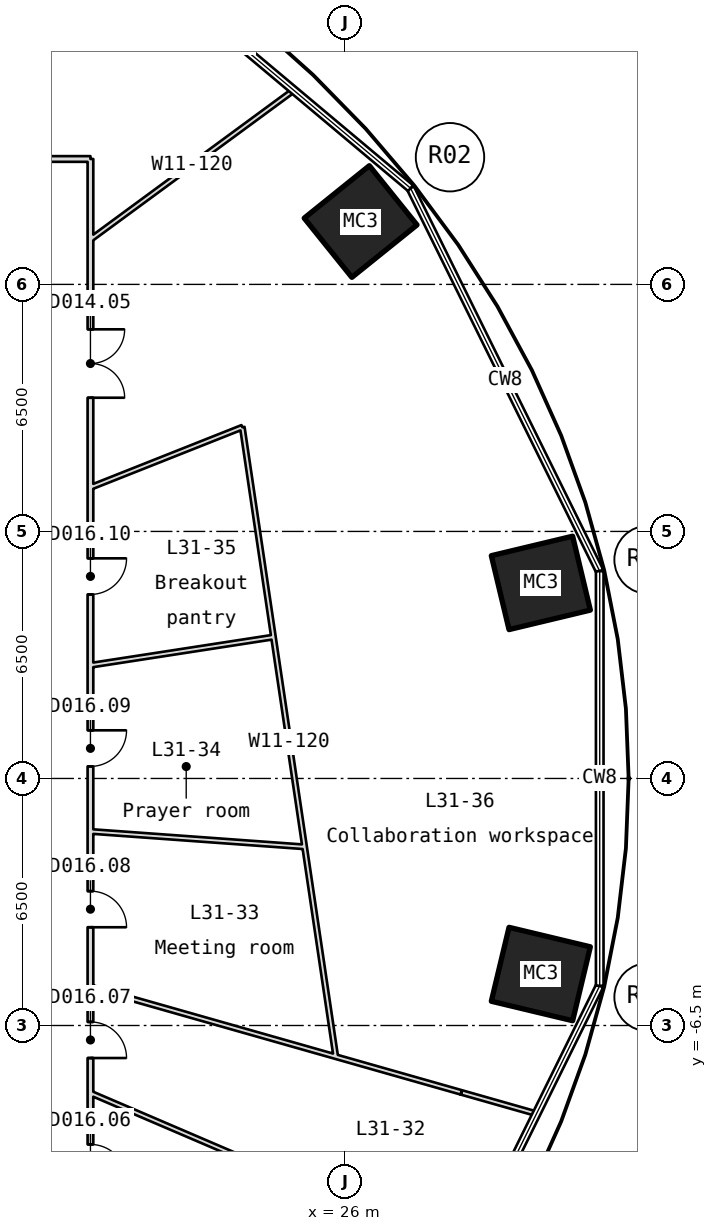
"""IFC4 building model, lengths in metres.
Left out: names, types, materials, properties, quantities, classifications, styles, units other than length and angle.
Written with IfcOpenShell. Run it as: python <this file> out.ifc"""

import sys

from ifc_helpers import new_model, si_unit, direction, frame, frame_2d, origin, origin_2d, place, context, subcontext, project, spatial, rectangle, hollow_rectangle, extrude, element, fill, save


model = new_model("IFC4")
c1 = context("Model", 3, precision=1e-05, world=origin(), true_north=direction((0.0, 1.0)))
c2 = subcontext(c1, "Body", "Model", "MODEL_VIEW")
j1 = project(units=[si_unit("LENGTHUNIT", "METRE"), si_unit("PLANEANGLEUNIT", "RADIAN")], contexts=[c1])
p1 = place(None, origin())
s1 = spatial("IfcSite", under=j1, at=p1, CompositionType="ELEMENT")
p2 = place(p1, origin())
s2 = spatial("IfcBuilding", under=s1, at=p2, CompositionType="ELEMENT")
p3 = place(p2, frame((0.0, 0.0, 145.05)))
s3 = spatial("IfcBuildingStorey", under=s2, at=p3, CompositionType="ELEMENT", Elevation=145.05)
for number, where, z_axis, x_axis in (
    (1, (31.152, 5.146, -0.2), (0.0, 0.0, 1.0), (0.233, -0.972, 0.0)),
    (2, (26.409, 14.654, -0.2), (0.0, 0.0, 1.0), (0.627, -0.779, 0.0)),
    (3, (31.152, -5.146, -0.2), (0.0, 0.0, 1.0), (-0.233, -0.972, 0.0)),
):
    element("IfcColumn", number, at=place(p3, frame(where, z_axis=z_axis, x_axis=x_axis)), inside=s3, PredefinedType="COLUMN", context=c2, shape_type="SweptSolid", body=[
        extrude(hollow_rectangle(XDim=2.0, YDim=2.2, WallThickness=0.08, at=origin_2d()), origin(), (0.0, 0.0, 1.0), 4.5),
    ])
p4 = place(p3, frame((-19.3, 16.3, 0.0), z_axis=(0.0, 0.0, 1.0), x_axis=(1.0, 0.0, 0.0)))
e4 = element("IfcWall", 4, at=p4, inside=s3, PredefinedType="PARTITIONING", context=c2, shape_type="SweptSolid", body=[
    extrude(rectangle(XDim=38.6, YDim=0.15, at=frame_2d((19.3, 0.0))), origin(), (0.0, 0.0, 1.0), 4.3),
])
p5 = place(p4, frame((28.692, 0.0, 0.0)))
e5 = element("IfcOpeningElement", 5, at=p5, cuts=e4, PredefinedType="OPENING", context=c2, shape_type="SweptSolid", body=[
    extrude(rectangle(XDim=1.8, YDim=2.1, at=frame_2d((0.9, 1.05))), frame((0.0, 0.085, 0.0), z_axis=(0.0, -1.0, 0.0), x_axis=(1.0, 0.0, 0.0)), (0.0, 0.0, 1.0), 0.17),
])
p6 = place(p4, frame((9.392, 0.0, 0.0)))
e6 = element("IfcOpeningElement", 6, at=p6, cuts=e4, PredefinedType="OPENING", context=c2, shape_type="SweptSolid", body=[
    extrude(rectangle(XDim=1.8, YDim=2.1, at=frame_2d((0.9, 1.05))), frame((0.0, 0.085, 0.0), z_axis=(0.0, -1.0, 0.0), x_axis=(1.0, 0.0, 0.0)), (0.0, 0.0, 1.0), 0.17),
])
p7 = place(p3, frame((19.3, -5.486, 0.0), z_axis=(0.0, 0.0, 1.0), x_axis=(0.961894512002, -0.273420825432, 0.0)))
e7 = element("IfcWall", 7, at=p7, inside=s3, PredefinedType="PARTITIONING", context=c2, shape_type="SweptSolid", body=[
    extrude(rectangle(XDim=10.144, YDim=0.12, at=frame_2d((5.072, 0.0))), origin(), (0.0, 0.0, 1.0), 3.688),
])
p8 = place(p3, frame((29.058, -8.26, 0.0), z_axis=(0.0, 0.0, 1.0), x_axis=(0.961885727632, -0.27345172696, 0.0)))
e8 = element("IfcWall", 8, at=p8, inside=s3, PredefinedType="PARTITIONING", context=c2, shape_type="SweptSolid", body=[
    extrude(rectangle(XDim=2.058, YDim=0.12, at=frame_2d((1.029, 0.0))), origin(), (0.0, 0.0, 1.0), 4.3),
])
p9 = place(p3, frame((19.3, 14.18, 0.0), z_axis=(0.0, 0.0, 1.0), x_axis=(0.805871425668, 0.592090571865, 0.0)))
e9 = element("IfcWall", 9, at=p9, inside=s3, PredefinedType="PARTITIONING", context=c2, shape_type="SweptSolid", body=[
    extrude(rectangle(XDim=6.637, YDim=0.12, at=frame_2d((3.319, 0.0))), origin(), (0.0, 0.0, 1.0), 4.3),
])
p10 = place(p3, frame((19.3, 16.3, 0.0), z_axis=(0.0, 0.0, 1.0), x_axis=(0.0, -1.0, 0.0)))
e10 = element("IfcWall", 10, at=p10, inside=s3, PredefinedType="PARTITIONING", context=c2, shape_type="SweptSolid", body=[
    extrude(rectangle(XDim=32.6, YDim=0.15, at=frame_2d((16.3, 0.0))), origin(), (0.0, 0.0, 1.0), 4.3),
])
p11 = place(p10, frame((29.941, 0.0, 0.0)))
e11 = element("IfcOpeningElement", 11, at=p11, cuts=e10, PredefinedType="OPENING", context=c2, shape_type="SweptSolid", body=[
    extrude(rectangle(XDim=0.95, YDim=2.1, at=frame_2d((0.475, 1.05))), frame((0.0, 0.085, 0.0), z_axis=(0.0, -1.0, 0.0), x_axis=(1.0, 0.0, 0.0)), (0.0, 0.0, 1.0), 0.17),
])
p12 = place(p10, frame((25.929, 0.0, 0.0)))
e12 = element("IfcOpeningElement", 12, at=p12, cuts=e10, PredefinedType="OPENING", context=c2, shape_type="SweptSolid", body=[
    extrude(rectangle(XDim=0.95, YDim=2.1, at=frame_2d((0.475, 1.05))), frame((0.0, 0.085, 0.0), z_axis=(0.0, -1.0, 0.0), x_axis=(1.0, 0.0, 0.0)), (0.0, 0.0, 1.0), 0.17),
])
p13 = place(p10, frame((22.706, 0.0, 0.0)))
e13 = element("IfcOpeningElement", 13, at=p13, cuts=e10, PredefinedType="OPENING", context=c2, shape_type="SweptSolid", body=[
    extrude(rectangle(XDim=0.95, YDim=2.1, at=frame_2d((0.475, 1.05))), frame((0.0, 0.085, 0.0), z_axis=(0.0, -1.0, 0.0), x_axis=(1.0, 0.0, 0.0)), (0.0, 0.0, 1.0), 0.17),
])
p14 = place(p10, frame((19.265, 0.0, 0.0)))
e14 = element("IfcOpeningElement", 14, at=p14, cuts=e10, PredefinedType="OPENING", context=c2, shape_type="SweptSolid", body=[
    extrude(rectangle(XDim=0.95, YDim=2.1, at=frame_2d((0.475, 1.05))), frame((0.0, 0.085, 0.0), z_axis=(0.0, -1.0, 0.0), x_axis=(1.0, 0.0, 0.0)), (0.0, 0.0, 1.0), 0.17),
])
p15 = place(p10, frame((15.033, 0.0, 0.0)))
e15 = element("IfcOpeningElement", 15, at=p15, cuts=e10, PredefinedType="OPENING", context=c2, shape_type="SweptSolid", body=[
    extrude(rectangle(XDim=0.95, YDim=2.1, at=frame_2d((0.475, 1.05))), frame((0.0, 0.085, 0.0), z_axis=(0.0, -1.0, 0.0), x_axis=(1.0, 0.0, 0.0)), (0.0, 0.0, 1.0), 0.17),
])
p16 = place(p10, frame((10.508, 0.0, 0.0)))
e16 = element("IfcOpeningElement", 16, at=p16, cuts=e10, PredefinedType="OPENING", context=c2, shape_type="SweptSolid", body=[
    extrude(rectangle(XDim=0.95, YDim=2.1, at=frame_2d((0.475, 1.05))), frame((0.0, 0.085, 0.0), z_axis=(0.0, -1.0, 0.0), x_axis=(1.0, 0.0, 0.0)), (0.0, 0.0, 1.0), 0.17),
])
p17 = place(p10, frame((4.482, 0.0, 0.0)))
e17 = element("IfcOpeningElement", 17, at=p17, cuts=e10, PredefinedType="OPENING", context=c2, shape_type="SweptSolid", body=[
    extrude(rectangle(XDim=1.8, YDim=2.1, at=frame_2d((0.9, 1.05))), frame((0.0, 0.085, 0.0), z_axis=(0.0, -1.0, 0.0), x_axis=(1.0, 0.0, 0.0)), (0.0, 0.0, 1.0), 0.17),
])
p18 = place(p3, frame((23.296, 9.242, 0.0), z_axis=(0.0, 0.0, 1.0), x_axis=(-0.92950709005, -0.368804242854, 0.0)))
e18 = element("IfcWall", 18, at=p18, inside=s3, PredefinedType="PARTITIONING", context=c2, shape_type="SweptSolid", body=[
    extrude(rectangle(XDim=4.299, YDim=0.12, at=frame_2d((2.149, 0.0))), origin(), (0.0, 0.0, 1.0), 4.3),
])
p19 = place(p3, frame((24.116, 3.721, 0.0), z_axis=(0.0, 0.0, 1.0), x_axis=(-0.988309639822, -0.152460013889, 0.0)))
e19 = element("IfcWall", 19, at=p19, inside=s3, PredefinedType="PARTITIONING", context=c2, shape_type="SweptSolid", body=[
    extrude(rectangle(XDim=4.873, YDim=0.12, at=frame_2d((2.437, 0.0))), origin(), (0.0, 0.0, 1.0), 4.3),
])
p20 = place(p3, frame((24.936, -1.8, 0.0), z_axis=(0.0, 0.0, 1.0), x_axis=(-0.997405788814, 0.071983973495, 0.0)))
e20 = element("IfcWall", 20, at=p20, inside=s3, PredefinedType="PARTITIONING", context=c2, shape_type="SweptSolid", body=[
    extrude(rectangle(XDim=5.65, YDim=0.12, at=frame_2d((2.825, 0.0))), origin(), (0.0, 0.0, 1.0), 4.3),
])
p21 = place(p3, frame((25.571, -10.966, 0.0), z_axis=(0.0, 0.0, 1.0), x_axis=(-0.919063581566, 0.394109290729, 0.0)))
e21 = element("IfcWall", 21, at=p21, inside=s3, PredefinedType="PARTITIONING", context=c2, shape_type="SweptSolid", body=[
    extrude(rectangle(XDim=6.823, YDim=0.12, at=frame_2d((3.412, 0.0))), origin(), (0.0, 0.0, 1.0), 4.3),
])
p22 = place(p3, frame((25.756, -7.321, 0.0), z_axis=(0.0, 0.0, 1.0), x_axis=(-0.146891581146, 0.989152598636, 0.0)))
e22 = element("IfcWall", 22, at=p22, inside=s3, PredefinedType="PARTITIONING", context=c2, shape_type="SweptSolid", body=[
    extrude(rectangle(XDim=16.745, YDim=0.12, at=frame_2d((8.373, 0.0))), origin(), (0.0, 0.0, 1.0), 4.3),
])
p23 = place(p12, origin())
e23 = element("IfcDoor", 23, at=p23, inside=s3, OperationType="SINGLE_SWING_RIGHT", PredefinedType="DOOR", context=c2, shape_type="SweptSolid", body=[
    extrude(rectangle(XDim=0.95, YDim=2.1, at=frame_2d((0.475, 1.05))), frame((0.0, 0.025, 0.0), z_axis=(0.0, -1.0, 0.0), x_axis=(1.0, 0.0, 0.0)), (0.0, 0.0, 1.0), 0.05),
])
fill(e12, e23)
p24 = place(p13, origin())
e24 = element("IfcDoor", 24, at=p24, inside=s3, OperationType="SINGLE_SWING_RIGHT", PredefinedType="DOOR", context=c2, shape_type="SweptSolid", body=[
    extrude(rectangle(XDim=0.95, YDim=2.1, at=frame_2d((0.475, 1.05))), frame((0.0, 0.025, 0.0), z_axis=(0.0, -1.0, 0.0), x_axis=(1.0, 0.0, 0.0)), (0.0, 0.0, 1.0), 0.05),
])
fill(e13, e24)
p25 = place(p14, origin())
e25 = element("IfcDoor", 25, at=p25, inside=s3, OperationType="SINGLE_SWING_RIGHT", PredefinedType="DOOR", context=c2, shape_type="SweptSolid", body=[
    extrude(rectangle(XDim=0.95, YDim=2.1, at=frame_2d((0.475, 1.05))), frame((0.0, 0.025, 0.0), z_axis=(0.0, -1.0, 0.0), x_axis=(1.0, 0.0, 0.0)), (0.0, 0.0, 1.0), 0.05),
])
fill(e14, e25)
p26 = place(p15, origin())
e26 = element("IfcDoor", 26, at=p26, inside=s3, OperationType="SINGLE_SWING_RIGHT", PredefinedType="DOOR", context=c2, shape_type="SweptSolid", body=[
    extrude(rectangle(XDim=0.95, YDim=2.1, at=frame_2d((0.475, 1.05))), frame((0.0, 0.025, 0.0), z_axis=(0.0, -1.0, 0.0), x_axis=(1.0, 0.0, 0.0)), (0.0, 0.0, 1.0), 0.05),
])
fill(e15, e26)
p27 = place(p16, origin())
e27 = element("IfcDoor", 27, at=p27, inside=s3, OperationType="SINGLE_SWING_RIGHT", PredefinedType="DOOR", context=c2, shape_type="SweptSolid", body=[
    extrude(rectangle(XDim=0.95, YDim=2.1, at=frame_2d((0.475, 1.05))), frame((0.0, 0.025, 0.0), z_axis=(0.0, -1.0, 0.0), x_axis=(1.0, 0.0, 0.0)), (0.0, 0.0, 1.0), 0.05),
])
fill(e16, e27)
p28 = place(p17, origin())
e28 = element("IfcDoor", 28, at=p28, inside=s3, OperationType="DOUBLE_DOOR_SINGLE_SWING", PredefinedType="DOOR", context=c2, shape_type="SweptSolid", body=[
    extrude(rectangle(XDim=1.8, YDim=2.1, at=frame_2d((0.9, 1.05))), frame((0.0, 0.025, 0.0), z_axis=(0.0, -1.0, 0.0), x_axis=(1.0, 0.0, 0.0)), (0.0, 0.0, 1.0), 0.05),
])
fill(e17, e28)
save(model, sys.argv[1])
